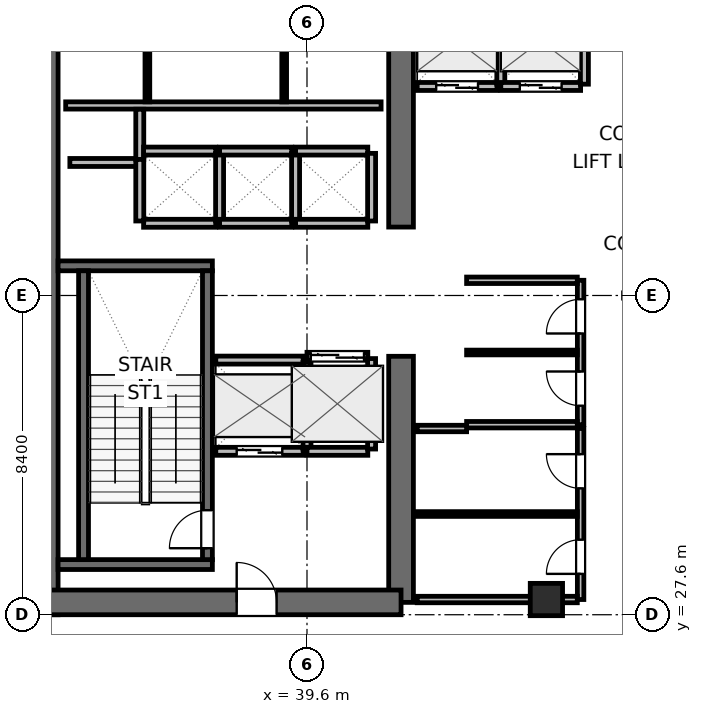
"""IFC4 building model, lengths in metres.
Left out: names, types, materials, properties, quantities, classifications, styles, units other than length and angle.
Written with IfcOpenShell. Run it as: python <this file> out.ifc"""

import sys

from ifc_helpers import new_model, si_unit, direction, frame, frame_2d, origin, origin_2d, place, context, subcontext, project, spatial, rectangle, extrude, element, fill, save


model = new_model("IFC4")
c1 = context("Model", 3, precision=1e-05, world=origin(), true_north=direction((0.0, 1.0)))
c2 = subcontext(c1, "Body", "Model", "MODEL_VIEW")
j1 = project(units=[si_unit("LENGTHUNIT", "METRE"), si_unit("PLANEANGLEUNIT", "RADIAN")], contexts=[c1])
p1 = place(None, origin())
s1 = spatial("IfcSite", under=j1, at=p1, CompositionType="ELEMENT")
p2 = place(p1, origin())
s2 = spatial("IfcBuilding", under=s1, at=p2, CompositionType="ELEMENT")
p3 = place(p2, frame((0.0, 0.0, 181.8)))
s3 = spatial("IfcBuildingStorey", under=s2, at=p3, CompositionType="ELEMENT", Elevation=181.8)
p4 = place(p3, frame((32.725, 27.6, 0.0), z_axis=(0.0, 0.0, 1.0), x_axis=(0.0, 1.0, 0.0)))
e1 = element("IfcWall", 1, at=p4, inside=s3, PredefinedType="SHEAR", context=c2, shape_type="SweptSolid", body=[
    extrude(rectangle(XDim=16.8, YDim=0.65, at=frame_2d((8.4, 0.0))), origin(), (0.0, 0.0, 1.0), 4.5),
])
p5 = place(p3, frame((42.075, 27.925, 0.0), z_axis=(0.0, 0.0, 1.0), x_axis=(0.0, 1.0, 0.0)))
e2 = element("IfcWall", 2, at=p5, inside=s3, PredefinedType="SHEAR", context=c2, shape_type="SweptSolid", body=[
    extrude(rectangle(XDim=6.475, YDim=0.65, at=frame_2d((3.237, 0.0))), origin(), (0.0, 0.0, 1.0), 4.5),
])
p6 = place(p3, frame((42.075, 37.8, 0.0), z_axis=(0.0, 0.0, 1.0), x_axis=(0.0, 1.0, 0.0)))
e3 = element("IfcWall", 3, at=p6, inside=s3, PredefinedType="SHEAR", context=c2, shape_type="SweptSolid", body=[
    extrude(rectangle(XDim=6.275, YDim=0.65, at=frame_2d((3.137, 0.0))), origin(), (0.0, 0.0, 1.0), 4.5),
])
p7 = place(p3, frame((32.725, 27.925, 0.0), z_axis=(0.0, 0.0, 1.0), x_axis=(1.0, 0.0, 0.0)))
e4 = element("IfcWall", 4, at=p7, inside=s3, PredefinedType="SHEAR", context=c2, shape_type="SweptSolid", body=[
    extrude(rectangle(XDim=9.35, YDim=0.65, at=frame_2d((4.675, 0.0))), origin(), (0.0, 0.0, 1.0), 4.5),
])
p8 = place(p7, frame((5.025, 0.0, 0.0)))
e5 = element("IfcOpeningElement", 5, at=p8, cuts=e4, PredefinedType="OPENING", context=c2, shape_type="SweptSolid", body=[
    extrude(rectangle(XDim=1.05, YDim=2.04, at=frame_2d((0.525, 1.02))), frame((0.0, 0.335, 0.0), z_axis=(0.0, -1.0, 0.0), x_axis=(1.0, 0.0, 0.0)), (0.0, 0.0, 1.0), 0.67),
])
for number, where, z_axis, x_axis in (
    (6, (33.05, 28.92, 0.0), (0.0, 0.0, 1.0), (1.0, 0.0, 0.0)),
    (7, (33.05, 36.78, 0.0), (0.0, 0.0, 1.0), (1.0, 0.0, 0.0)),
):
    element("IfcWall", number, at=place(p3, frame(where, z_axis=z_axis, x_axis=x_axis)), inside=s3, PredefinedType="SHEAR", context=c2, shape_type="SweptSolid", body=[
        extrude(rectangle(XDim=4.06, YDim=0.26, at=frame_2d((2.03, 0.0))), origin(), (0.0, 0.0, 1.0), 4.5),
    ])
p9 = place(p3, frame((33.72, 29.05, 0.0), z_axis=(0.0, 0.0, 1.0), x_axis=(0.0, 1.0, 0.0)))
e8 = element("IfcWall", 8, at=p9, inside=s3, PredefinedType="SHEAR", context=c2, shape_type="SweptSolid", body=[
    extrude(rectangle(XDim=7.6, YDim=0.26, at=frame_2d((3.8, 0.0))), origin(), (0.0, 0.0, 1.0), 4.5),
])
p10 = place(p3, frame((36.98, 29.05, 0.0), z_axis=(0.0, 0.0, 1.0), x_axis=(0.0, 1.0, 0.0)))
e9 = element("IfcWall", 9, at=p10, inside=s3, PredefinedType="SHEAR", context=c2, shape_type="SweptSolid", body=[
    extrude(rectangle(XDim=7.6, YDim=0.26, at=frame_2d((3.8, 0.0))), origin(), (0.0, 0.0, 1.0), 4.5),
])
p11 = place(p10, frame((0.3, 0.0, 0.0)))
e10 = element("IfcOpeningElement", 10, at=p11, cuts=e9, PredefinedType="OPENING", context=c2, shape_type="SweptSolid", body=[
    extrude(rectangle(XDim=1.0, YDim=2.04, at=frame_2d((0.5, 1.02))), frame((0.0, 0.14, 0.0), z_axis=(0.0, -1.0, 0.0), x_axis=(1.0, 0.0, 0.0)), (0.0, 0.0, 1.0), 0.28),
])
p12 = place(p3, frame((45.9, 28.0, 0.0), z_axis=(0.0, 0.0, 1.0), x_axis=(1.0, 0.0, 0.0)))
e11 = element("IfcColumn", 11, at=p12, inside=s3, PredefinedType="COLUMN", context=c2, shape_type="SweptSolid", body=[
    extrude(rectangle(XDim=0.85, YDim=0.85, at=origin_2d()), origin(), (0.0, 0.0, 1.0), 4.5),
])
p13 = place(p3, frame((33.25, 41.0, 0.0), z_axis=(0.0, 0.0, 1.0), x_axis=(1.0, 0.0, 0.0)))
e12 = element("IfcWall", 12, at=p13, inside=s3, PredefinedType="PLUMBINGWALL", context=c2, shape_type="SweptSolid", body=[
    extrude(rectangle(XDim=8.3, YDim=0.19, at=frame_2d((4.15, 0.0))), origin(), (0.0, 0.0, 1.0), 4.28),
])
for number, where, z_axis, x_axis in (
    (13, (35.4, 41.095, 0.0), (0.0, 0.0, 1.0), (0.0, 1.0, 0.0)),
    (14, (39.0, 41.095, 0.0), (0.0, 0.0, 1.0), (0.0, 1.0, 0.0)),
):
    element("IfcWall", number, at=place(p3, frame(where, z_axis=z_axis, x_axis=x_axis)), inside=s3, PredefinedType="PARTITIONING", context=c2, shape_type="SweptSolid", body=[
        extrude(rectangle(XDim=2.455, YDim=0.125, at=frame_2d((1.228, 0.0))), origin(), (0.0, 0.0, 1.0), 4.28),
    ])
p14 = place(p3, frame((33.36, 39.5, 0.0), z_axis=(0.0, 0.0, 1.0), x_axis=(1.0, 0.0, 0.0)))
e15 = element("IfcWall", 15, at=p14, inside=s3, PredefinedType="PARTITIONING", context=c2, shape_type="SweptSolid", body=[
    extrude(rectangle(XDim=1.86, YDim=0.21, at=frame_2d((0.93, 0.0))), origin(), (0.0, 0.0, 1.0), 4.28),
])
p15 = place(p3, frame((35.2, 39.58, 0.0), z_axis=(0.0, 0.0, 1.0), x_axis=(0.0, 1.0, 0.0)))
e16 = element("IfcWall", 16, at=p15, inside=s3, PredefinedType="PARTITIONING", context=c2, shape_type="SweptSolid", body=[
    extrude(rectangle(XDim=1.32, YDim=0.21, at=frame_2d((0.66, 0.0))), origin(), (0.0, 0.0, 1.0), 4.28),
])
p16 = place(p3, frame((37.2, 31.9, 0.0), z_axis=(0.0, 0.0, 1.0), x_axis=(1.0, 0.0, 0.0)))
e17 = element("IfcWall", 17, at=p16, inside=s3, PredefinedType="PARTITIONING", context=c2, shape_type="SweptSolid", body=[
    extrude(rectangle(XDim=2.3, YDim=0.21, at=frame_2d((1.15, 0.0))), origin(), (0.0, 0.0, 1.0), 4.28),
])
p17 = place(p16, frame((0.55, 0.0, 0.0)))
e18 = element("IfcOpeningElement", 18, at=p17, cuts=e17, PredefinedType="OPENING", context=c2, shape_type="SweptSolid", body=[
    extrude(rectangle(XDim=1.2, YDim=2.04, at=frame_2d((0.6, 1.02))), frame((0.0, 0.115, 0.0), z_axis=(0.0, -1.0, 0.0), x_axis=(1.0, 0.0, 0.0)), (0.0, 0.0, 1.0), 0.23),
])
p18 = place(p3, frame((37.2, 34.3, 0.0), z_axis=(0.0, 0.0, 1.0), x_axis=(1.0, 0.0, 0.0)))
e19 = element("IfcWall", 19, at=p18, inside=s3, PredefinedType="PARTITIONING", context=c2, shape_type="SweptSolid", body=[
    extrude(rectangle(XDim=2.3, YDim=0.21, at=frame_2d((1.15, 0.0))), origin(), (0.0, 0.0, 1.0), 4.28),
])
p19 = place(p3, frame((39.6, 31.96, 0.0), z_axis=(0.0, 0.0, 1.0), x_axis=(0.0, 1.0, 0.0)))
e20 = element("IfcWall", 20, at=p19, inside=s3, PredefinedType="PARTITIONING", context=c2, shape_type="SweptSolid", body=[
    extrude(rectangle(XDim=2.28, YDim=0.21, at=frame_2d((1.14, 0.0))), origin(), (0.0, 0.0, 1.0), 4.28),
])
p20 = place(p3, frame((39.6, 34.4, 0.0), z_axis=(0.0, 0.0, 1.0), x_axis=(1.0, 0.0, 0.0)))
e21 = element("IfcWall", 21, at=p20, inside=s3, PredefinedType="PARTITIONING", context=c2, shape_type="SweptSolid", body=[
    extrude(rectangle(XDim=1.6, YDim=0.21, at=frame_2d((0.8, 0.0))), origin(), (0.0, 0.0, 1.0), 4.28),
])
p21 = place(p20, frame((0.1, 0.0, 0.0)))
e22 = element("IfcOpeningElement", 22, at=p21, cuts=e21, PredefinedType="OPENING", context=c2, shape_type="SweptSolid", body=[
    extrude(rectangle(XDim=1.4, YDim=2.06, at=frame_2d((0.7, 1.03))), frame((0.0, 0.115, 0.0), z_axis=(0.0, -1.0, 0.0), x_axis=(1.0, 0.0, 0.0)), (0.0, 0.0, 1.0), 0.23),
])
p22 = place(p3, frame((39.6, 31.9, 0.0), z_axis=(0.0, 0.0, 1.0), x_axis=(1.0, 0.0, 0.0)))
e23 = element("IfcWall", 23, at=p22, inside=s3, PredefinedType="PARTITIONING", context=c2, shape_type="SweptSolid", body=[
    extrude(rectangle(XDim=1.6, YDim=0.21, at=frame_2d((0.8, 0.0))), origin(), (0.0, 0.0, 1.0), 4.28),
])
p23 = place(p3, frame((41.3, 31.96, 0.0), z_axis=(0.0, 0.0, 1.0), x_axis=(0.0, 1.0, 0.0)))
e24 = element("IfcWall", 24, at=p23, inside=s3, PredefinedType="PARTITIONING", context=c2, shape_type="SweptSolid", body=[
    extrude(rectangle(XDim=2.38, YDim=0.21, at=frame_2d((1.19, 0.0))), origin(), (0.0, 0.0, 1.0), 4.28),
])
p24 = place(p3, frame((42.5, 41.5, 0.0), z_axis=(0.0, 0.0, 1.0), x_axis=(1.0, 0.0, 0.0)))
e25 = element("IfcWall", 25, at=p24, inside=s3, PredefinedType="PARTITIONING", context=c2, shape_type="SweptSolid", body=[
    extrude(rectangle(XDim=2.1, YDim=0.21, at=frame_2d((1.05, 0.0))), origin(), (0.0, 0.0, 1.0), 4.28),
])
p25 = place(p24, frame((0.5, 0.0, 0.0)))
e26 = element("IfcOpeningElement", 26, at=p25, cuts=e25, PredefinedType="OPENING", context=c2, shape_type="SweptSolid", body=[
    extrude(rectangle(XDim=1.1, YDim=2.04, at=frame_2d((0.55, 1.02))), frame((0.0, 0.115, 0.0), z_axis=(0.0, -1.0, 0.0), x_axis=(1.0, 0.0, 0.0)), (0.0, 0.0, 1.0), 0.23),
])
p26 = place(p3, frame((44.7, 41.56, 0.0), z_axis=(0.0, 0.0, 1.0), x_axis=(0.0, 1.0, 0.0)))
e27 = element("IfcWall", 27, at=p26, inside=s3, PredefinedType="PARTITIONING", context=c2, shape_type="SweptSolid", body=[
    extrude(rectangle(XDim=2.28, YDim=0.21, at=frame_2d((1.14, 0.0))), origin(), (0.0, 0.0, 1.0), 4.28),
])
p27 = place(p3, frame((44.7, 41.5, 0.0), z_axis=(0.0, 0.0, 1.0), x_axis=(1.0, 0.0, 0.0)))
e28 = element("IfcWall", 28, at=p27, inside=s3, PredefinedType="PARTITIONING", context=c2, shape_type="SweptSolid", body=[
    extrude(rectangle(XDim=2.1, YDim=0.21, at=frame_2d((1.05, 0.0))), origin(), (0.0, 0.0, 1.0), 4.28),
])
p28 = place(p27, frame((0.5, 0.0, 0.0)))
e29 = element("IfcOpeningElement", 29, at=p28, cuts=e28, PredefinedType="OPENING", context=c2, shape_type="SweptSolid", body=[
    extrude(rectangle(XDim=1.1, YDim=2.04, at=frame_2d((0.55, 1.02))), frame((0.0, 0.115, 0.0), z_axis=(0.0, -1.0, 0.0), x_axis=(1.0, 0.0, 0.0)), (0.0, 0.0, 1.0), 0.23),
])
p29 = place(p3, frame((46.9, 41.56, 0.0), z_axis=(0.0, 0.0, 1.0), x_axis=(0.0, 1.0, 0.0)))
e30 = element("IfcWall", 30, at=p29, inside=s3, PredefinedType="PARTITIONING", context=c2, shape_type="SweptSolid", body=[
    extrude(rectangle(XDim=2.28, YDim=0.21, at=frame_2d((1.14, 0.0))), origin(), (0.0, 0.0, 1.0), 4.28),
])
for number, where, z_axis, x_axis in (
    (31, (35.3, 37.9, 0.0), (0.0, 0.0, 1.0), (1.0, 0.0, 0.0)),
    (32, (35.3, 39.8, 0.0), (0.0, 0.0, 1.0), (1.0, 0.0, 0.0)),
):
    element("IfcWall", number, at=place(p3, frame(where, z_axis=z_axis, x_axis=x_axis)), inside=s3, PredefinedType="PARTITIONING", context=c2, shape_type="SweptSolid", body=[
        extrude(rectangle(XDim=1.9, YDim=0.21, at=frame_2d((0.95, 0.0))), origin(), (0.0, 0.0, 1.0), 4.28),
    ])
p30 = place(p3, frame((35.2, 37.96, 0.0), z_axis=(0.0, 0.0, 1.0), x_axis=(0.0, 1.0, 0.0)))
e33 = element("IfcWall", 33, at=p30, inside=s3, PredefinedType="PARTITIONING", context=c2, shape_type="SweptSolid", body=[
    extrude(rectangle(XDim=1.62, YDim=0.21, at=frame_2d((0.81, 0.0))), origin(), (0.0, 0.0, 1.0), 4.28),
])
p31 = place(p3, frame((37.3, 37.96, 0.0), z_axis=(0.0, 0.0, 1.0), x_axis=(0.0, 1.0, 0.0)))
e34 = element("IfcWall", 34, at=p31, inside=s3, PredefinedType="PARTITIONING", context=c2, shape_type="SweptSolid", body=[
    extrude(rectangle(XDim=1.78, YDim=0.21, at=frame_2d((0.89, 0.0))), origin(), (0.0, 0.0, 1.0), 4.28),
])
for number, where, z_axis, x_axis in (
    (35, (37.3, 37.9, 0.0), (0.0, 0.0, 1.0), (1.0, 0.0, 0.0)),
    (36, (37.3, 39.8, 0.0), (0.0, 0.0, 1.0), (1.0, 0.0, 0.0)),
):
    element("IfcWall", number, at=place(p3, frame(where, z_axis=z_axis, x_axis=x_axis)), inside=s3, PredefinedType="PARTITIONING", context=c2, shape_type="SweptSolid", body=[
        extrude(rectangle(XDim=1.9, YDim=0.21, at=frame_2d((0.95, 0.0))), origin(), (0.0, 0.0, 1.0), 4.28),
    ])
p32 = place(p3, frame((39.3, 37.96, 0.0), z_axis=(0.0, 0.0, 1.0), x_axis=(0.0, 1.0, 0.0)))
e37 = element("IfcWall", 37, at=p32, inside=s3, PredefinedType="PARTITIONING", context=c2, shape_type="SweptSolid", body=[
    extrude(rectangle(XDim=1.78, YDim=0.21, at=frame_2d((0.89, 0.0))), origin(), (0.0, 0.0, 1.0), 4.28),
])
for number, where, z_axis, x_axis in (
    (38, (39.3, 37.9, 0.0), (0.0, 0.0, 1.0), (1.0, 0.0, 0.0)),
    (39, (39.3, 39.8, 0.0), (0.0, 0.0, 1.0), (1.0, 0.0, 0.0)),
):
    element("IfcWall", number, at=place(p3, frame(where, z_axis=z_axis, x_axis=x_axis)), inside=s3, PredefinedType="PARTITIONING", context=c2, shape_type="SweptSolid", body=[
        extrude(rectangle(XDim=1.9, YDim=0.21, at=frame_2d((0.95, 0.0))), origin(), (0.0, 0.0, 1.0), 4.28),
    ])
p33 = place(p3, frame((41.3, 37.96, 0.0), z_axis=(0.0, 0.0, 1.0), x_axis=(0.0, 1.0, 0.0)))
e40 = element("IfcWall", 40, at=p33, inside=s3, PredefinedType="PARTITIONING", context=c2, shape_type="SweptSolid", body=[
    extrude(rectangle(XDim=1.78, YDim=0.21, at=frame_2d((0.89, 0.0))), origin(), (0.0, 0.0, 1.0), 4.28),
])
p34 = place(p3, frame((46.8, 32.6, 0.0), z_axis=(0.0, 0.0, 1.0), x_axis=(0.0, 1.0, 0.0)))
e41 = element("IfcWall", 41, at=p34, inside=s3, PredefinedType="PARTITIONING", context=c2, shape_type="SweptSolid", body=[
    extrude(rectangle(XDim=3.8, YDim=0.17, at=frame_2d((1.9, 0.0))), origin(), (0.0, 0.0, 1.0), 4.28),
])
p35 = place(p34, frame((0.5, 0.0, 0.0)))
e42 = element("IfcOpeningElement", 42, at=p35, cuts=e41, PredefinedType="OPENING", context=c2, shape_type="SweptSolid", body=[
    extrude(rectangle(XDim=0.9, YDim=2.02, at=frame_2d((0.45, 1.01))), frame((0.0, 0.095, 0.0), z_axis=(0.0, -1.0, 0.0), x_axis=(1.0, 0.0, 0.0)), (0.0, 0.0, 1.0), 0.19),
])
p36 = place(p34, frame((2.4, 0.0, 0.0)))
e43 = element("IfcOpeningElement", 43, at=p36, cuts=e41, PredefinedType="OPENING", context=c2, shape_type="SweptSolid", body=[
    extrude(rectangle(XDim=0.9, YDim=2.02, at=frame_2d((0.45, 1.01))), frame((0.0, 0.095, 0.0), z_axis=(0.0, -1.0, 0.0), x_axis=(1.0, 0.0, 0.0)), (0.0, 0.0, 1.0), 0.19),
])
for number, where, z_axis, x_axis in (
    (44, (43.8, 32.6, 0.0), (0.0, 0.0, 1.0), (1.0, 0.0, 0.0)),
    (45, (43.8, 36.4, 0.0), (0.0, 0.0, 1.0), (1.0, 0.0, 0.0)),
):
    element("IfcWall", number, at=place(p3, frame(where, z_axis=z_axis, x_axis=x_axis)), inside=s3, PredefinedType="PARTITIONING", context=c2, shape_type="SweptSolid", body=[
        extrude(rectangle(XDim=2.913, YDim=0.17, at=frame_2d((1.457, 0.0))), origin(), (0.0, 0.0, 1.0), 4.28),
    ])
p37 = place(p3, frame((43.8, 34.5, 0.0), z_axis=(0.0, 0.0, 1.0), x_axis=(1.0, 0.0, 0.0)))
e46 = element("IfcWall", 46, at=p37, inside=s3, PredefinedType="PARTITIONING", context=c2, shape_type="SweptSolid", body=[
    extrude(rectangle(XDim=2.913, YDim=0.125, at=frame_2d((1.457, 0.0))), origin(), (0.0, 0.0, 1.0), 4.28),
])
p38 = place(p3, frame((46.8, 28.0, 0.0), z_axis=(0.0, 0.0, 1.0), x_axis=(0.0, 1.0, 0.0)))
e47 = element("IfcWall", 47, at=p38, inside=s3, PredefinedType="PARTITIONING", context=c2, shape_type="SweptSolid", body=[
    extrude(rectangle(XDim=4.5, YDim=0.17, at=frame_2d((2.25, 0.0))), origin(), (0.0, 0.0, 1.0), 4.28),
])
p39 = place(p38, frame((0.675, 0.0, 0.0)))
e48 = element("IfcOpeningElement", 48, at=p39, cuts=e47, PredefinedType="OPENING", context=c2, shape_type="SweptSolid", body=[
    extrude(rectangle(XDim=0.9, YDim=2.02, at=frame_2d((0.45, 1.01))), frame((0.0, 0.095, 0.0), z_axis=(0.0, -1.0, 0.0), x_axis=(1.0, 0.0, 0.0)), (0.0, 0.0, 1.0), 0.19),
])
p40 = place(p38, frame((2.925, 0.0, 0.0)))
e49 = element("IfcOpeningElement", 49, at=p40, cuts=e47, PredefinedType="OPENING", context=c2, shape_type="SweptSolid", body=[
    extrude(rectangle(XDim=0.9, YDim=2.02, at=frame_2d((0.45, 1.01))), frame((0.0, 0.095, 0.0), z_axis=(0.0, -1.0, 0.0), x_axis=(1.0, 0.0, 0.0)), (0.0, 0.0, 1.0), 0.19),
])
p41 = place(p3, frame((42.5, 28.0, 0.0), z_axis=(0.0, 0.0, 1.0), x_axis=(1.0, 0.0, 0.0)))
e50 = element("IfcWall", 50, at=p41, inside=s3, PredefinedType="PARTITIONING", context=c2, shape_type="SweptSolid", body=[
    extrude(rectangle(XDim=4.213, YDim=0.17, at=frame_2d((2.106, 0.0))), origin(), (0.0, 0.0, 1.0), 3.365),
])
p42 = place(p3, frame((42.5, 32.5, 0.0), z_axis=(0.0, 0.0, 1.0), x_axis=(1.0, 0.0, 0.0)))
e51 = element("IfcWall", 51, at=p42, inside=s3, PredefinedType="PARTITIONING", context=c2, shape_type="SweptSolid", body=[
    extrude(rectangle(XDim=1.3, YDim=0.17, at=frame_2d((0.65, 0.0))), origin(), (0.0, 0.0, 1.0), 4.28),
])
p43 = place(p3, frame((42.5, 30.25, 0.0), z_axis=(0.0, 0.0, 1.0), x_axis=(1.0, 0.0, 0.0)))
e52 = element("IfcWall", 52, at=p43, inside=s3, PredefinedType="PARTITIONING", context=c2, shape_type="SweptSolid", body=[
    extrude(rectangle(XDim=4.213, YDim=0.125, at=frame_2d((2.106, 0.0))), origin(), (0.0, 0.0, 1.0), 4.28),
])
p44 = place(p11, origin())
e53 = element("IfcDoor", 53, at=p44, inside=s3, OperationType="SINGLE_SWING_LEFT", PredefinedType="DOOR", context=c2, shape_type="SweptSolid", body=[
    extrude(rectangle(XDim=1.0, YDim=2.04, at=frame_2d((0.5, 1.02))), frame((0.0, 0.025, 0.0), z_axis=(0.0, -1.0, 0.0), x_axis=(1.0, 0.0, 0.0)), (0.0, 0.0, 1.0), 0.05),
])
fill(e10, e53)
p45 = place(p17, origin())
e54 = element("IfcDoor", 54, at=p45, inside=s3, OperationType="DOUBLE_DOOR_SLIDING", PredefinedType="DOOR", context=c2, shape_type="SweptSolid", body=[
    extrude(rectangle(XDim=1.2, YDim=2.04, at=frame_2d((0.6, 1.02))), frame((0.0, 0.025, 0.0), z_axis=(0.0, -1.0, 0.0), x_axis=(1.0, 0.0, 0.0)), (0.0, 0.0, 1.0), 0.05),
])
fill(e18, e54)
p46 = place(p21, origin())
e55 = element("IfcDoor", 55, at=p46, inside=s3, OperationType="DOUBLE_DOOR_SLIDING", PredefinedType="DOOR", context=c2, shape_type="SweptSolid", body=[
    extrude(rectangle(XDim=1.4, YDim=2.06, at=frame_2d((0.7, 1.03))), frame((0.0, 0.025, 0.0), z_axis=(0.0, -1.0, 0.0), x_axis=(1.0, 0.0, 0.0)), (0.0, 0.0, 1.0), 0.05),
])
fill(e22, e55)
p47 = place(p25, origin())
e56 = element("IfcDoor", 56, at=p47, inside=s3, OperationType="DOUBLE_DOOR_SLIDING", PredefinedType="DOOR", context=c2, shape_type="SweptSolid", body=[
    extrude(rectangle(XDim=1.1, YDim=2.04, at=frame_2d((0.55, 1.02))), frame((0.0, 0.025, 0.0), z_axis=(0.0, -1.0, 0.0), x_axis=(1.0, 0.0, 0.0)), (0.0, 0.0, 1.0), 0.05),
])
fill(e26, e56)
p48 = place(p28, origin())
e57 = element("IfcDoor", 57, at=p48, inside=s3, OperationType="DOUBLE_DOOR_SLIDING", PredefinedType="DOOR", context=c2, shape_type="SweptSolid", body=[
    extrude(rectangle(XDim=1.1, YDim=2.04, at=frame_2d((0.55, 1.02))), frame((0.0, 0.025, 0.0), z_axis=(0.0, -1.0, 0.0), x_axis=(1.0, 0.0, 0.0)), (0.0, 0.0, 1.0), 0.05),
])
fill(e29, e57)
p49 = place(p8, origin())
e58 = element("IfcDoor", 58, at=p49, inside=s3, OperationType="SINGLE_SWING_LEFT", PredefinedType="DOOR", context=c2, shape_type="SweptSolid", body=[
    extrude(rectangle(XDim=1.05, YDim=2.04, at=frame_2d((0.525, 1.02))), frame((0.0, 0.025, 0.0), z_axis=(0.0, -1.0, 0.0), x_axis=(1.0, 0.0, 0.0)), (0.0, 0.0, 1.0), 0.05),
])
fill(e5, e58)
p50 = place(p35, origin())
e59 = element("IfcDoor", 59, at=p50, inside=s3, OperationType="SINGLE_SWING_RIGHT", PredefinedType="DOOR", context=c2, shape_type="SweptSolid", body=[
    extrude(rectangle(XDim=0.9, YDim=2.02, at=frame_2d((0.45, 1.01))), frame((0.0, 0.025, 0.0), z_axis=(0.0, -1.0, 0.0), x_axis=(1.0, 0.0, 0.0)), (0.0, 0.0, 1.0), 0.05),
])
fill(e42, e59)
p51 = place(p36, origin())
e60 = element("IfcDoor", 60, at=p51, inside=s3, OperationType="SINGLE_SWING_LEFT", PredefinedType="DOOR", context=c2, shape_type="SweptSolid", body=[
    extrude(rectangle(XDim=0.9, YDim=2.02, at=frame_2d((0.45, 1.01))), frame((0.0, 0.025, 0.0), z_axis=(0.0, -1.0, 0.0), x_axis=(1.0, 0.0, 0.0)), (0.0, 0.0, 1.0), 0.05),
])
fill(e43, e60)
p52 = place(p39, origin())
e61 = element("IfcDoor", 61, at=p52, inside=s3, OperationType="SINGLE_SWING_LEFT", PredefinedType="DOOR", context=c2, shape_type="SweptSolid", body=[
    extrude(rectangle(XDim=0.9, YDim=2.02, at=frame_2d((0.45, 1.01))), frame((0.0, 0.025, 0.0), z_axis=(0.0, -1.0, 0.0), x_axis=(1.0, 0.0, 0.0)), (0.0, 0.0, 1.0), 0.05),
])
fill(e48, e61)
p53 = place(p40, origin())
e62 = element("IfcDoor", 62, at=p53, inside=s3, OperationType="SINGLE_SWING_RIGHT", PredefinedType="DOOR", context=c2, shape_type="SweptSolid", body=[
    extrude(rectangle(XDim=0.9, YDim=2.02, at=frame_2d((0.45, 1.01))), frame((0.0, 0.025, 0.0), z_axis=(0.0, -1.0, 0.0), x_axis=(1.0, 0.0, 0.0)), (0.0, 0.0, 1.0), 0.05),
])
fill(e49, e62)
save(model, sys.argv[1])
